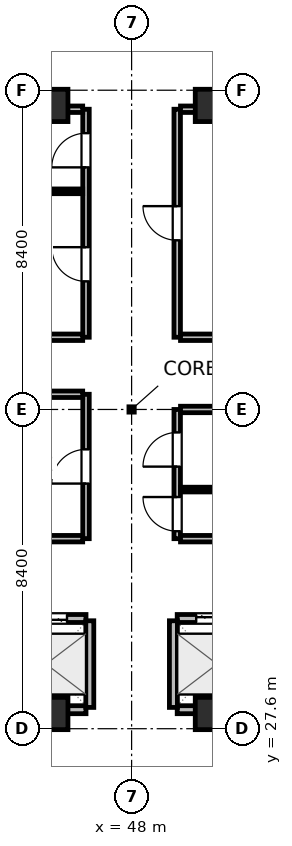
"""IFC4 building model, lengths in metres.
Left out: names, types, materials, properties, quantities, classifications, styles, units other than length and angle.
Written with IfcOpenShell. Run it as: python <this file> out.ifc"""

import sys

from ifc_helpers import new_model, si_unit, direction, frame, frame_2d, origin, origin_2d, place, context, subcontext, project, spatial, rectangle, extrude, element, fill, save


model = new_model("IFC4")
c1 = context("Model", 3, precision=1e-05, world=origin(), true_north=direction((0.0, 1.0)))
c2 = subcontext(c1, "Body", "Model", "MODEL_VIEW")
j1 = project(units=[si_unit("LENGTHUNIT", "METRE"), si_unit("PLANEANGLEUNIT", "RADIAN")], contexts=[c1])
p1 = place(None, origin())
s1 = spatial("IfcSite", under=j1, at=p1, CompositionType="ELEMENT")
p2 = place(p1, origin())
s2 = spatial("IfcBuilding", under=s1, at=p2, CompositionType="ELEMENT")
p3 = place(p2, frame((0.0, 0.0, 68.4)))
s3 = spatial("IfcBuildingStorey", under=s2, at=p3, CompositionType="ELEMENT", Elevation=68.4)
for number, where, z_axis, x_axis in (
    (1, (45.9, 28.0, 0.0), (0.0, 0.0, 1.0), (1.0, 0.0, 0.0)),
    (2, (50.1, 28.0, 0.0), (0.0, 0.0, 1.0), (1.0, 0.0, 0.0)),
    (3, (45.9, 44.0, 0.0), (0.0, 0.0, 1.0), (1.0, 0.0, 0.0)),
    (4, (50.1, 44.0, 0.0), (0.0, 0.0, 1.0), (1.0, 0.0, 0.0)),
):
    element("IfcColumn", number, at=place(p3, frame(where, z_axis=z_axis, x_axis=x_axis)), inside=s3, PredefinedType="COLUMN", context=c2, shape_type="SweptSolid", body=[
        extrude(rectangle(XDim=0.85, YDim=0.85, at=origin_2d()), origin(), (0.0, 0.0, 1.0), 4.5),
    ])
p4 = place(p3, frame((44.7, 30.5, 0.0), z_axis=(0.0, 0.0, 1.0), x_axis=(1.0, 0.0, 0.0)))
e5 = element("IfcWall", 5, at=p4, inside=s3, PredefinedType="PARTITIONING", context=c2, shape_type="SweptSolid", body=[
    extrude(rectangle(XDim=2.1, YDim=0.21, at=frame_2d((1.05, 0.0))), origin(), (0.0, 0.0, 1.0), 4.24),
])
p5 = place(p4, frame((0.5, 0.0, 0.0)))
e6 = element("IfcOpeningElement", 6, at=p5, cuts=e5, PredefinedType="OPENING", context=c2, shape_type="SweptSolid", body=[
    extrude(rectangle(XDim=1.1, YDim=2.04, at=frame_2d((0.55, 1.02))), frame((0.0, 0.115, 0.0), z_axis=(0.0, -1.0, 0.0), x_axis=(1.0, 0.0, 0.0)), (0.0, 0.0, 1.0), 0.23),
])
p6 = place(p3, frame((44.7, 28.1, 0.0), z_axis=(0.0, 0.0, 1.0), x_axis=(1.0, 0.0, 0.0)))
e7 = element("IfcWall", 7, at=p6, inside=s3, PredefinedType="PARTITIONING", context=c2, shape_type="SweptSolid", body=[
    extrude(rectangle(XDim=2.1, YDim=0.21, at=frame_2d((1.05, 0.0))), origin(), (0.0, 0.0, 1.0), 3.125),
])
p7 = place(p3, frame((46.9, 28.16, 0.0), z_axis=(0.0, 0.0, 1.0), x_axis=(0.0, 1.0, 0.0)))
e8 = element("IfcWall", 8, at=p7, inside=s3, PredefinedType="PARTITIONING", context=c2, shape_type="SweptSolid", body=[
    extrude(rectangle(XDim=2.28, YDim=0.21, at=frame_2d((1.14, 0.0))), origin(), (0.0, 0.0, 1.0), 4.24),
])
p8 = place(p3, frame((49.2, 30.5, 0.0), z_axis=(0.0, 0.0, 1.0), x_axis=(1.0, 0.0, 0.0)))
e9 = element("IfcWall", 9, at=p8, inside=s3, PredefinedType="PARTITIONING", context=c2, shape_type="SweptSolid", body=[
    extrude(rectangle(XDim=2.1, YDim=0.21, at=frame_2d((1.05, 0.0))), origin(), (0.0, 0.0, 1.0), 4.24),
])
p9 = place(p8, frame((0.5, 0.0, 0.0)))
e10 = element("IfcOpeningElement", 10, at=p9, cuts=e9, PredefinedType="OPENING", context=c2, shape_type="SweptSolid", body=[
    extrude(rectangle(XDim=1.1, YDim=2.04, at=frame_2d((0.55, 1.02))), frame((0.0, 0.115, 0.0), z_axis=(0.0, -1.0, 0.0), x_axis=(1.0, 0.0, 0.0)), (0.0, 0.0, 1.0), 0.23),
])
p10 = place(p3, frame((49.2, 28.1, 0.0), z_axis=(0.0, 0.0, 1.0), x_axis=(1.0, 0.0, 0.0)))
e11 = element("IfcWall", 11, at=p10, inside=s3, PredefinedType="PARTITIONING", context=c2, shape_type="SweptSolid", body=[
    extrude(rectangle(XDim=2.1, YDim=0.21, at=frame_2d((1.05, 0.0))), origin(), (0.0, 0.0, 1.0), 3.125),
])
p11 = place(p3, frame((49.1, 28.16, 0.0), z_axis=(0.0, 0.0, 1.0), x_axis=(0.0, 1.0, 0.0)))
e12 = element("IfcWall", 12, at=p11, inside=s3, PredefinedType="PARTITIONING", context=c2, shape_type="SweptSolid", body=[
    extrude(rectangle(XDim=2.28, YDim=0.21, at=frame_2d((1.14, 0.0))), origin(), (0.0, 0.0, 1.0), 4.24),
])
p12 = place(p3, frame((46.8, 32.6, 0.0), z_axis=(0.0, 0.0, 1.0), x_axis=(0.0, 1.0, 0.0)))
e13 = element("IfcWall", 13, at=p12, inside=s3, PredefinedType="PARTITIONING", context=c2, shape_type="SweptSolid", body=[
    extrude(rectangle(XDim=3.8, YDim=0.17, at=frame_2d((1.9, 0.0))), origin(), (0.0, 0.0, 1.0), 4.24),
])
p13 = place(p12, frame((1.45, 0.0, 0.0)))
e14 = element("IfcOpeningElement", 14, at=p13, cuts=e13, PredefinedType="OPENING", context=c2, shape_type="SweptSolid", body=[
    extrude(rectangle(XDim=0.9, YDim=2.02, at=frame_2d((0.45, 1.01))), frame((0.0, 0.095, 0.0), z_axis=(0.0, -1.0, 0.0), x_axis=(1.0, 0.0, 0.0)), (0.0, 0.0, 1.0), 0.19),
])
for number, where, z_axis, x_axis in (
    (15, (43.8, 32.6, 0.0), (0.0, 0.0, 1.0), (1.0, 0.0, 0.0)),
    (16, (43.8, 36.4, 0.0), (0.0, 0.0, 1.0), (1.0, 0.0, 0.0)),
):
    element("IfcWall", number, at=place(p3, frame(where, z_axis=z_axis, x_axis=x_axis)), inside=s3, PredefinedType="PARTITIONING", context=c2, shape_type="SweptSolid", body=[
        extrude(rectangle(XDim=2.913, YDim=0.17, at=frame_2d((1.457, 0.0))), origin(), (0.0, 0.0, 1.0), 4.24),
    ])
p14 = place(p3, frame((49.2, 32.6, 0.0), z_axis=(0.0, 0.0, 1.0), x_axis=(0.0, 1.0, 0.0)))
e17 = element("IfcWall", 17, at=p14, inside=s3, PredefinedType="PARTITIONING", context=c2, shape_type="SweptSolid", body=[
    extrude(rectangle(XDim=3.4, YDim=0.17, at=frame_2d((1.7, 0.0))), origin(), (0.0, 0.0, 1.0), 4.24),
])
p15 = place(p14, frame((0.196, 0.0, 0.0)))
e18 = element("IfcOpeningElement", 18, at=p15, cuts=e17, PredefinedType="OPENING", context=c2, shape_type="SweptSolid", body=[
    extrude(rectangle(XDim=0.9, YDim=2.02, at=frame_2d((0.45, 1.01))), frame((0.0, 0.095, 0.0), z_axis=(0.0, -1.0, 0.0), x_axis=(1.0, 0.0, 0.0)), (0.0, 0.0, 1.0), 0.19),
])
p16 = place(p14, frame((1.896, 0.0, 0.0)))
e19 = element("IfcOpeningElement", 19, at=p16, cuts=e17, PredefinedType="OPENING", context=c2, shape_type="SweptSolid", body=[
    extrude(rectangle(XDim=0.9, YDim=2.02, at=frame_2d((0.45, 1.01))), frame((0.0, 0.095, 0.0), z_axis=(0.0, -1.0, 0.0), x_axis=(1.0, 0.0, 0.0)), (0.0, 0.0, 1.0), 0.19),
])
for number, where, z_axis, x_axis in (
    (20, (49.287, 32.6, 0.0), (0.0, 0.0, 1.0), (1.0, 0.0, 0.0)),
    (21, (49.287, 36.0, 0.0), (0.0, 0.0, 1.0), (1.0, 0.0, 0.0)),
):
    element("IfcWall", number, at=place(p3, frame(where, z_axis=z_axis, x_axis=x_axis)), inside=s3, PredefinedType="PARTITIONING", context=c2, shape_type="SweptSolid", body=[
        extrude(rectangle(XDim=2.913, YDim=0.17, at=frame_2d((1.457, 0.0))), origin(), (0.0, 0.0, 1.0), 4.24),
    ])
p17 = place(p3, frame((49.287, 33.892, 0.0), z_axis=(0.0, 0.0, 1.0), x_axis=(1.0, 0.0, 0.0)))
e22 = element("IfcWall", 22, at=p17, inside=s3, PredefinedType="PARTITIONING", context=c2, shape_type="SweptSolid", body=[
    extrude(rectangle(XDim=2.913, YDim=0.125, at=frame_2d((1.457, 0.0))), origin(), (0.0, 0.0, 1.0), 4.24),
])
p18 = place(p3, frame((46.8, 37.9, 0.0), z_axis=(0.0, 0.0, 1.0), x_axis=(0.0, 1.0, 0.0)))
e23 = element("IfcWall", 23, at=p18, inside=s3, PredefinedType="PARTITIONING", context=c2, shape_type="SweptSolid", body=[
    extrude(rectangle(XDim=6.0, YDim=0.17, at=frame_2d((3.0, 0.0))), origin(), (0.0, 0.0, 1.0), 4.24),
])
p19 = place(p18, frame((1.47, 0.0, 0.0)))
e24 = element("IfcOpeningElement", 24, at=p19, cuts=e23, PredefinedType="OPENING", context=c2, shape_type="SweptSolid", body=[
    extrude(rectangle(XDim=0.9, YDim=2.02, at=frame_2d((0.45, 1.01))), frame((0.0, 0.095, 0.0), z_axis=(0.0, -1.0, 0.0), x_axis=(1.0, 0.0, 0.0)), (0.0, 0.0, 1.0), 0.19),
])
p20 = place(p18, frame((4.47, 0.0, 0.0)))
e25 = element("IfcOpeningElement", 25, at=p20, cuts=e23, PredefinedType="OPENING", context=c2, shape_type="SweptSolid", body=[
    extrude(rectangle(XDim=0.9, YDim=2.02, at=frame_2d((0.45, 1.01))), frame((0.0, 0.095, 0.0), z_axis=(0.0, -1.0, 0.0), x_axis=(1.0, 0.0, 0.0)), (0.0, 0.0, 1.0), 0.19),
])
p21 = place(p3, frame((42.5, 37.9, 0.0), z_axis=(0.0, 0.0, 1.0), x_axis=(1.0, 0.0, 0.0)))
e26 = element("IfcWall", 26, at=p21, inside=s3, PredefinedType="PARTITIONING", context=c2, shape_type="SweptSolid", body=[
    extrude(rectangle(XDim=4.213, YDim=0.17, at=frame_2d((2.106, 0.0))), origin(), (0.0, 0.0, 1.0), 4.24),
])
p22 = place(p3, frame((42.5, 43.9, 0.0), z_axis=(0.0, 0.0, 1.0), x_axis=(1.0, 0.0, 0.0)))
e27 = element("IfcWall", 27, at=p22, inside=s3, PredefinedType="PARTITIONING", context=c2, shape_type="SweptSolid", body=[
    extrude(rectangle(XDim=4.213, YDim=0.17, at=frame_2d((2.106, 0.0))), origin(), (0.0, 0.0, 1.0), 3.125),
])
p23 = place(p3, frame((42.5, 41.74, 0.0), z_axis=(0.0, 0.0, 1.0), x_axis=(1.0, 0.0, 0.0)))
e28 = element("IfcWall", 28, at=p23, inside=s3, PredefinedType="PARTITIONING", context=c2, shape_type="SweptSolid", body=[
    extrude(rectangle(XDim=4.213, YDim=0.125, at=frame_2d((2.106, 0.0))), origin(), (0.0, 0.0, 1.0), 4.24),
])
p24 = place(p3, frame((49.2, 37.9, 0.0), z_axis=(0.0, 0.0, 1.0), x_axis=(0.0, 1.0, 0.0)))
e29 = element("IfcWall", 29, at=p24, inside=s3, PredefinedType="PARTITIONING", context=c2, shape_type="SweptSolid", body=[
    extrude(rectangle(XDim=6.0, YDim=0.17, at=frame_2d((3.0, 0.0))), origin(), (0.0, 0.0, 1.0), 4.24),
])
p25 = place(p24, frame((2.55, 0.0, 0.0)))
e30 = element("IfcOpeningElement", 30, at=p25, cuts=e29, PredefinedType="OPENING", context=c2, shape_type="SweptSolid", body=[
    extrude(rectangle(XDim=0.9, YDim=2.02, at=frame_2d((0.45, 1.01))), frame((0.0, 0.095, 0.0), z_axis=(0.0, -1.0, 0.0), x_axis=(1.0, 0.0, 0.0)), (0.0, 0.0, 1.0), 0.19),
])
p26 = place(p3, frame((49.287, 37.9, 0.0), z_axis=(0.0, 0.0, 1.0), x_axis=(1.0, 0.0, 0.0)))
e31 = element("IfcWall", 31, at=p26, inside=s3, PredefinedType="PARTITIONING", context=c2, shape_type="SweptSolid", body=[
    extrude(rectangle(XDim=4.113, YDim=0.17, at=frame_2d((2.056, 0.0))), origin(), (0.0, 0.0, 1.0), 4.24),
])
p27 = place(p3, frame((49.287, 43.9, 0.0), z_axis=(0.0, 0.0, 1.0), x_axis=(1.0, 0.0, 0.0)))
e32 = element("IfcWall", 32, at=p27, inside=s3, PredefinedType="PARTITIONING", context=c2, shape_type="SweptSolid", body=[
    extrude(rectangle(XDim=4.113, YDim=0.17, at=frame_2d((2.056, 0.0))), origin(), (0.0, 0.0, 1.0), 3.125),
])
p28 = place(p5, origin())
e33 = element("IfcDoor", 33, at=p28, inside=s3, OperationType="DOUBLE_DOOR_SLIDING", PredefinedType="DOOR", context=c2, shape_type="SweptSolid", body=[
    extrude(rectangle(XDim=1.1, YDim=2.04, at=frame_2d((0.55, 1.02))), frame((0.0, 0.025, 0.0), z_axis=(0.0, -1.0, 0.0), x_axis=(1.0, 0.0, 0.0)), (0.0, 0.0, 1.0), 0.05),
])
fill(e6, e33)
p29 = place(p9, origin())
e34 = element("IfcDoor", 34, at=p29, inside=s3, OperationType="DOUBLE_DOOR_SLIDING", PredefinedType="DOOR", context=c2, shape_type="SweptSolid", body=[
    extrude(rectangle(XDim=1.1, YDim=2.04, at=frame_2d((0.55, 1.02))), frame((0.0, 0.025, 0.0), z_axis=(0.0, -1.0, 0.0), x_axis=(1.0, 0.0, 0.0)), (0.0, 0.0, 1.0), 0.05),
])
fill(e10, e34)
p30 = place(p13, origin())
e35 = element("IfcDoor", 35, at=p30, inside=s3, OperationType="SINGLE_SWING_LEFT", PredefinedType="DOOR", context=c2, shape_type="SweptSolid", body=[
    extrude(rectangle(XDim=0.9, YDim=2.02, at=frame_2d((0.45, 1.01))), frame((0.0, 0.025, 0.0), z_axis=(0.0, -1.0, 0.0), x_axis=(1.0, 0.0, 0.0)), (0.0, 0.0, 1.0), 0.05),
])
fill(e14, e35)
p31 = place(p15, origin())
e36 = element("IfcDoor", 36, at=p31, inside=s3, OperationType="SINGLE_SWING_RIGHT", PredefinedType="DOOR", context=c2, shape_type="SweptSolid", body=[
    extrude(rectangle(XDim=0.9, YDim=2.02, at=frame_2d((0.45, 1.01))), frame((0.0, 0.025, 0.0), z_axis=(0.0, -1.0, 0.0), x_axis=(1.0, 0.0, 0.0)), (0.0, 0.0, 1.0), 0.05),
])
fill(e18, e36)
p32 = place(p16, origin())
e37 = element("IfcDoor", 37, at=p32, inside=s3, OperationType="SINGLE_SWING_LEFT", PredefinedType="DOOR", context=c2, shape_type="SweptSolid", body=[
    extrude(rectangle(XDim=0.9, YDim=2.02, at=frame_2d((0.45, 1.01))), frame((0.0, 0.025, 0.0), z_axis=(0.0, -1.0, 0.0), x_axis=(1.0, 0.0, 0.0)), (0.0, 0.0, 1.0), 0.05),
])
fill(e19, e37)
p33 = place(p19, origin())
e38 = element("IfcDoor", 38, at=p33, inside=s3, OperationType="SINGLE_SWING_RIGHT", PredefinedType="DOOR", context=c2, shape_type="SweptSolid", body=[
    extrude(rectangle(XDim=0.9, YDim=2.02, at=frame_2d((0.45, 1.01))), frame((0.0, 0.025, 0.0), z_axis=(0.0, -1.0, 0.0), x_axis=(1.0, 0.0, 0.0)), (0.0, 0.0, 1.0), 0.05),
])
fill(e24, e38)
p34 = place(p20, origin())
e39 = element("IfcDoor", 39, at=p34, inside=s3, OperationType="SINGLE_SWING_LEFT", PredefinedType="DOOR", context=c2, shape_type="SweptSolid", body=[
    extrude(rectangle(XDim=0.9, YDim=2.02, at=frame_2d((0.45, 1.01))), frame((0.0, 0.025, 0.0), z_axis=(0.0, -1.0, 0.0), x_axis=(1.0, 0.0, 0.0)), (0.0, 0.0, 1.0), 0.05),
])
fill(e25, e39)
p35 = place(p25, origin())
e40 = element("IfcDoor", 40, at=p35, inside=s3, OperationType="SINGLE_SWING_RIGHT", PredefinedType="DOOR", context=c2, shape_type="SweptSolid", body=[
    extrude(rectangle(XDim=0.9, YDim=2.02, at=frame_2d((0.45, 1.01))), frame((0.0, 0.025, 0.0), z_axis=(0.0, -1.0, 0.0), x_axis=(1.0, 0.0, 0.0)), (0.0, 0.0, 1.0), 0.05),
])
fill(e30, e40)
save(model, sys.argv[1])
